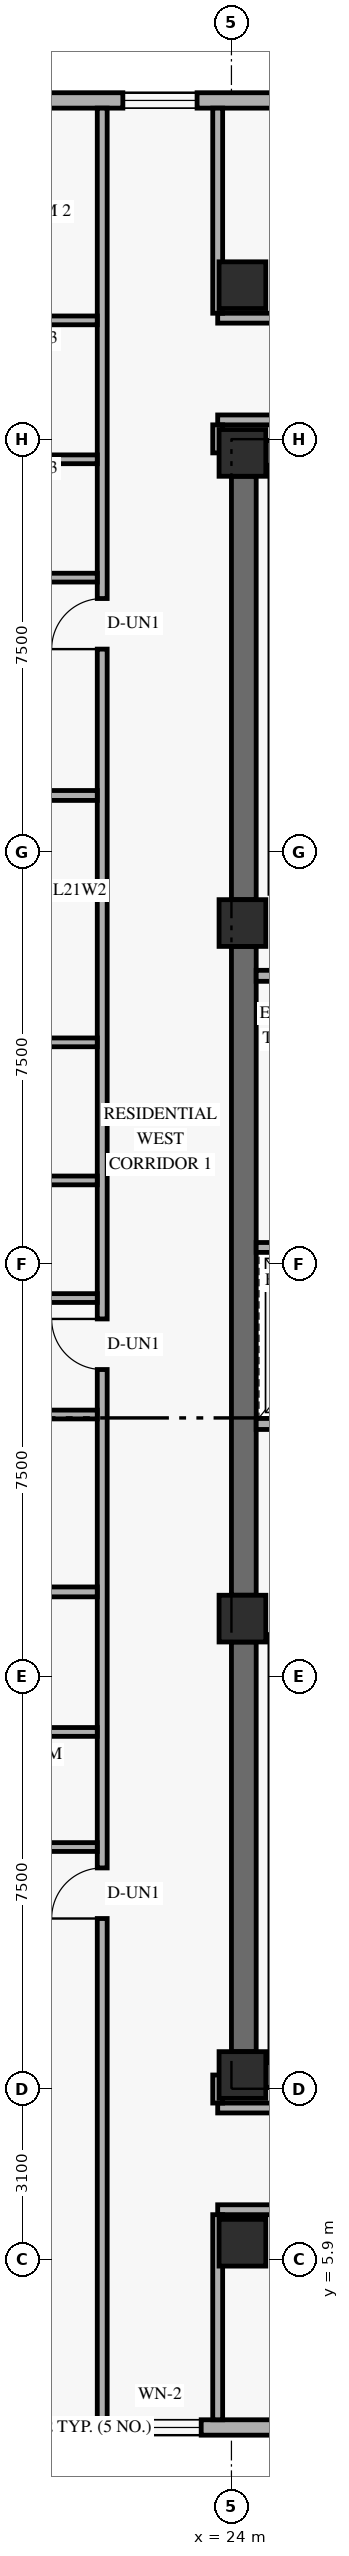
"""IFC4 building model, lengths in metres.
Left out: names, types, materials, properties, quantities, classifications, styles, units other than length and angle.
Written with IfcOpenShell. Run it as: python <this file> out.ifc"""

import sys

from ifc_helpers import new_model, si_unit, direction, frame, frame_2d, origin, origin_2d, place, context, subcontext, project, spatial, rectangle, extrude, element, fill, save


model = new_model("IFC4")
c1 = context("Model", 3, precision=1e-05, world=origin(), true_north=direction((0.0, 1.0)))
c2 = subcontext(c1, "Body", "Model", "MODEL_VIEW")
j1 = project(units=[si_unit("LENGTHUNIT", "METRE"), si_unit("PLANEANGLEUNIT", "RADIAN")], contexts=[c1])
p1 = place(None, origin())
s1 = spatial("IfcSite", under=j1, at=p1, CompositionType="ELEMENT")
p2 = place(p1, origin())
s2 = spatial("IfcBuilding", under=s1, at=p2, CompositionType="ELEMENT")
p3 = place(p2, frame((0.0, 0.0, 84.0)))
s3 = spatial("IfcBuildingStorey", under=s2, at=p3, CompositionType="ELEMENT", Elevation=84.0)
p4 = place(p3, frame((24.225, 9.675, 0.0), z_axis=(0.0, 0.0, 1.0), x_axis=(0.0, 1.0, 0.0)))
e1 = element("IfcWall", 1, at=p4, inside=s3, PredefinedType="SHEAR", context=c2, shape_type="SweptSolid", body=[
    extrude(rectangle(XDim=7.45, YDim=0.45, at=frame_2d((3.725, 0.0))), origin(), (0.0, 0.0, 1.0), 2.749),
])
p5 = place(p3, frame((24.225, 17.975, 0.0), z_axis=(0.0, 0.0, 1.0), x_axis=(0.0, 1.0, 0.0)))
e2 = element("IfcWall", 2, at=p5, inside=s3, PredefinedType="SHEAR", context=c2, shape_type="SweptSolid", body=[
    extrude(rectangle(XDim=11.8, YDim=0.45, at=frame_2d((5.9, 0.0))), origin(), (0.0, 0.0, 1.0), 2.749),
])
p6 = place(p3, frame((24.225, 30.625, 0.0), z_axis=(0.0, 0.0, 1.0), x_axis=(0.0, 1.0, 0.0)))
e3 = element("IfcWall", 3, at=p6, inside=s3, PredefinedType="SHEAR", context=c2, shape_type="SweptSolid", body=[
    extrude(rectangle(XDim=7.7, YDim=0.45, at=frame_2d((3.85, 0.0))), origin(), (0.0, 0.0, 1.0), 2.749),
])
for number, where, z_axis, x_axis in (
    (4, (24.625, 9.25, 0.0), (0.0, 0.0, 1.0), (1.0, 0.0, 0.0)),
    (5, (24.625, 38.75, 0.0), (0.0, 0.0, 1.0), (1.0, 0.0, 0.0)),
):
    element("IfcWall", number, at=place(p3, frame(where, z_axis=z_axis, x_axis=x_axis)), inside=s3, PredefinedType="SHEAR", context=c2, shape_type="SweptSolid", body=[
        extrude(rectangle(XDim=10.15, YDim=0.45, at=frame_2d((5.075, 0.0))), origin(), (0.0, 0.0, 1.0), 3.36),
    ])
for number, where, z_axis, x_axis in (
    (6, (24.2, 6.2, 0.0), (0.0, 0.0, 1.0), (1.0, 0.0, 0.0)),
    (7, (24.2, 9.25, 0.0), (0.0, 0.0, 1.0), (1.0, 0.0, 0.0)),
    (8, (24.2, 17.55, 0.0), (0.0, 0.0, 1.0), (1.0, 0.0, 0.0)),
    (9, (24.2, 30.2, 0.0), (0.0, 0.0, 1.0), (1.0, 0.0, 0.0)),
    (10, (24.2, 38.75, 0.0), (0.0, 0.0, 1.0), (1.0, 0.0, 0.0)),
    (11, (24.2, 41.8, 0.0), (0.0, 0.0, 1.0), (1.0, 0.0, 0.0)),
):
    element("IfcColumn", number, at=place(p3, frame(where, z_axis=z_axis, x_axis=x_axis)), inside=s3, PredefinedType="COLUMN", context=c2, shape_type="SweptSolid", body=[
        extrude(rectangle(XDim=0.85, YDim=0.85, at=origin_2d()), origin(), (0.0, 0.0, 1.0), 3.6),
    ])
p7 = place(p3, frame((13.42, 2.84, 0.0), z_axis=(0.0, 0.0, 1.0), x_axis=(1.0, 0.0, 0.0)))
e12 = element("IfcWall", 12, at=p7, inside=s3, PredefinedType="SOLIDWALL", context=c2, shape_type="SweptSolid", body=[
    extrude(rectangle(XDim=15.481, YDim=0.28, at=frame_2d((7.741, 0.0))), origin(), (0.0, 0.0, 1.0), 3.36),
])
p8 = place(p7, frame((3.365, 0.0, 0.85)))
e13 = element("IfcOpeningElement", 13, at=p8, cuts=e12, PredefinedType="OPENING", context=c2, shape_type="SweptSolid", body=[
    extrude(rectangle(XDim=1.5, YDim=1.55, at=frame_2d((0.75, 0.775))), frame((0.0, 0.15, 0.0), z_axis=(0.0, -1.0, 0.0), x_axis=(1.0, 0.0, 0.0)), (0.0, 0.0, 1.0), 0.3),
])
p9 = place(p7, frame((8.53, 0.0, 0.85)))
e14 = element("IfcOpeningElement", 14, at=p9, cuts=e12, PredefinedType="OPENING", context=c2, shape_type="SweptSolid", body=[
    extrude(rectangle(XDim=1.5, YDim=1.55, at=frame_2d((0.75, 0.775))), frame((0.0, 0.15, 0.0), z_axis=(0.0, -1.0, 0.0), x_axis=(1.0, 0.0, 0.0)), (0.0, 0.0, 1.0), 0.3),
])
p10 = place(p7, frame((12.156, 0.0, 0.85)))
e15 = element("IfcOpeningElement", 15, at=p10, cuts=e12, PredefinedType="OPENING", context=c2, shape_type="SweptSolid", body=[
    extrude(rectangle(XDim=1.5, YDim=1.55, at=frame_2d((0.75, 0.775))), frame((0.0, 0.15, 0.0), z_axis=(0.0, -1.0, 0.0), x_axis=(1.0, 0.0, 0.0)), (0.0, 0.0, 1.0), 0.3),
])
p11 = place(p3, frame((49.98, 45.16, 0.0), z_axis=(0.0, 0.0, 1.0), x_axis=(-1.0, 0.0, 0.0)))
e16 = element("IfcWall", 16, at=p11, inside=s3, PredefinedType="SOLIDWALL", context=c2, shape_type="SweptSolid", body=[
    extrude(rectangle(XDim=36.56, YDim=0.28, at=frame_2d((18.28, 0.0))), origin(), (0.0, 0.0, 1.0), 3.36),
])
p12 = place(p11, frame((31.14, 0.0, 0.85)))
e17 = element("IfcOpeningElement", 17, at=p12, cuts=e16, PredefinedType="OPENING", context=c2, shape_type="SweptSolid", body=[
    extrude(rectangle(XDim=1.35, YDim=1.55, at=frame_2d((0.675, 0.775))), frame((0.0, 0.15, 0.0), z_axis=(0.0, -1.0, 0.0), x_axis=(1.0, 0.0, 0.0)), (0.0, 0.0, 1.0), 0.3),
])
p13 = place(p11, frame((26.605, 0.0, 0.85)))
e18 = element("IfcOpeningElement", 18, at=p13, cuts=e16, PredefinedType="OPENING", context=c2, shape_type="SweptSolid", body=[
    extrude(rectangle(XDim=1.35, YDim=1.55, at=frame_2d((0.675, 0.775))), frame((0.0, 0.15, 0.0), z_axis=(0.0, -1.0, 0.0), x_axis=(1.0, 0.0, 0.0)), (0.0, 0.0, 1.0), 0.3),
])
p14 = place(p11, frame((22.754, 0.0, 0.85)))
e19 = element("IfcOpeningElement", 19, at=p14, cuts=e16, PredefinedType="OPENING", context=c2, shape_type="SweptSolid", body=[
    extrude(rectangle(XDim=1.35, YDim=1.55, at=frame_2d((0.675, 0.775))), frame((0.0, 0.15, 0.0), z_axis=(0.0, -1.0, 0.0), x_axis=(1.0, 0.0, 0.0)), (0.0, 0.0, 1.0), 0.3),
])
p15 = place(p11, frame((16.919, 0.0, 0.85)))
e20 = element("IfcOpeningElement", 20, at=p15, cuts=e16, PredefinedType="OPENING", context=c2, shape_type="SweptSolid", body=[
    extrude(rectangle(XDim=1.35, YDim=1.55, at=frame_2d((0.675, 0.775))), frame((0.0, 0.15, 0.0), z_axis=(0.0, -1.0, 0.0), x_axis=(1.0, 0.0, 0.0)), (0.0, 0.0, 1.0), 0.3),
])
p16 = place(p11, frame((12.82, 0.0, 0.85)))
e21 = element("IfcOpeningElement", 21, at=p16, cuts=e16, PredefinedType="OPENING", context=c2, shape_type="SweptSolid", body=[
    extrude(rectangle(XDim=1.35, YDim=1.55, at=frame_2d((0.675, 0.775))), frame((0.0, 0.15, 0.0), z_axis=(0.0, -1.0, 0.0), x_axis=(1.0, 0.0, 0.0)), (0.0, 0.0, 1.0), 0.3),
])
p17 = place(p11, frame((7.758, 0.0, 0.85)))
e22 = element("IfcOpeningElement", 22, at=p17, cuts=e16, PredefinedType="OPENING", context=c2, shape_type="SweptSolid", body=[
    extrude(rectangle(XDim=1.35, YDim=1.55, at=frame_2d((0.675, 0.775))), frame((0.0, 0.15, 0.0), z_axis=(0.0, -1.0, 0.0), x_axis=(1.0, 0.0, 0.0)), (0.0, 0.0, 1.0), 0.3),
])
p18 = place(p11, frame((1.542, 0.0, 0.85)))
e23 = element("IfcOpeningElement", 23, at=p18, cuts=e16, PredefinedType="OPENING", context=c2, shape_type="SweptSolid", body=[
    extrude(rectangle(XDim=1.35, YDim=1.55, at=frame_2d((0.675, 0.775))), frame((0.0, 0.15, 0.0), z_axis=(0.0, -1.0, 0.0), x_axis=(1.0, 0.0, 0.0)), (0.0, 0.0, 1.0), 0.3),
])
p19 = place(p3, frame((24.45, 21.09, 0.0), z_axis=(0.0, 0.0, 1.0), x_axis=(1.0, 0.0, 0.0)))
e24 = element("IfcWall", 24, at=p19, inside=s3, PredefinedType="STANDARD", context=c2, shape_type="SweptSolid", body=[
    extrude(rectangle(XDim=6.83, YDim=0.2, at=frame_2d((3.415, 0.0))), origin(), (0.0, 0.0, 1.0), 3.36),
])
p20 = place(p19, frame((0.72, 0.0, 0.0)))
e25 = element("IfcOpeningElement", 25, at=p20, cuts=e24, PredefinedType="OPENING", context=c2, shape_type="SweptSolid", body=[
    extrude(rectangle(XDim=1.1, YDim=2.2, at=frame_2d((0.55, 1.1))), frame((0.0, 0.11, 0.0), z_axis=(0.0, -1.0, 0.0), x_axis=(1.0, 0.0, 0.0)), (0.0, 0.0, 1.0), 0.22),
])
p21 = place(p19, frame((3.32, 0.0, 0.0)))
e26 = element("IfcOpeningElement", 26, at=p21, cuts=e24, PredefinedType="OPENING", context=c2, shape_type="SweptSolid", body=[
    extrude(rectangle(XDim=1.1, YDim=2.2, at=frame_2d((0.55, 1.1))), frame((0.0, 0.11, 0.0), z_axis=(0.0, -1.0, 0.0), x_axis=(1.0, 0.0, 0.0)), (0.0, 0.0, 1.0), 0.22),
])
p22 = place(p3, frame((24.45, 24.3, 0.0), z_axis=(0.0, 0.0, 1.0), x_axis=(1.0, 0.0, 0.0)))
e27 = element("IfcWall", 27, at=p22, inside=s3, PredefinedType="STANDARD", context=c2, shape_type="SweptSolid", body=[
    extrude(rectangle(XDim=6.83, YDim=0.18, at=frame_2d((3.415, 0.0))), origin(), (0.0, 0.0, 1.0), 3.36),
])
p23 = place(p3, frame((24.45, 29.24, 0.0), z_axis=(0.0, 0.0, 1.0), x_axis=(1.0, 0.0, 0.0)))
e28 = element("IfcWall", 28, at=p23, inside=s3, PredefinedType="STANDARD", context=c2, shape_type="SweptSolid", body=[
    extrude(rectangle(XDim=3.65, YDim=0.2, at=frame_2d((1.825, 0.0))), origin(), (0.0, 0.0, 1.0), 3.36),
])
p24 = place(p3, frame((21.65, 2.98, 0.0), z_axis=(0.0, 0.0, 1.0), x_axis=(0.0, 1.0, 0.0)))
e29 = element("IfcWall", 29, at=p24, inside=s3, PredefinedType="STANDARD", context=c2, shape_type="SweptSolid", body=[
    extrude(rectangle(XDim=42.04, YDim=0.18, at=frame_2d((21.02, 0.0))), origin(), (0.0, 0.0, 1.0), 2.731),
])
p25 = place(p24, frame((9.116, 0.0, 0.0)))
e30 = element("IfcOpeningElement", 30, at=p25, cuts=e29, PredefinedType="OPENING", context=c2, shape_type="SweptSolid", body=[
    extrude(rectangle(XDim=0.92, YDim=2.15, at=frame_2d((0.46, 1.075))), frame((0.0, 0.1, 0.0), z_axis=(0.0, -1.0, 0.0), x_axis=(1.0, 0.0, 0.0)), (0.0, 0.0, 1.0), 0.2),
])
p26 = place(p24, frame((19.1, 0.0, 0.0)))
e31 = element("IfcOpeningElement", 31, at=p26, cuts=e29, PredefinedType="OPENING", context=c2, shape_type="SweptSolid", body=[
    extrude(rectangle(XDim=0.92, YDim=2.15, at=frame_2d((0.46, 1.075))), frame((0.0, 0.1, 0.0), z_axis=(0.0, -1.0, 0.0), x_axis=(1.0, 0.0, 0.0)), (0.0, 0.0, 1.0), 0.2),
])
p27 = place(p24, frame((32.201, 0.0, 0.0)))
e32 = element("IfcOpeningElement", 32, at=p27, cuts=e29, PredefinedType="OPENING", context=c2, shape_type="SweptSolid", body=[
    extrude(rectangle(XDim=0.92, YDim=2.15, at=frame_2d((0.46, 1.075))), frame((0.0, 0.1, 0.0), z_axis=(0.0, -1.0, 0.0), x_axis=(1.0, 0.0, 0.0)), (0.0, 0.0, 1.0), 0.2),
])
p28 = place(p3, frame((23.75, 6.8, 0.0), z_axis=(0.0, 0.0, 1.0), x_axis=(1.0, 0.0, 0.0)))
e33 = element("IfcWall", 33, at=p28, inside=s3, PredefinedType="STANDARD", context=c2, shape_type="SweptSolid", body=[
    extrude(rectangle(XDim=11.67, YDim=0.18, at=frame_2d((5.835, 0.0))), origin(), (0.0, 0.0, 1.0), 2.731),
])
p29 = place(p28, frame((1.5, 0.0, 0.0)))
e34 = element("IfcOpeningElement", 34, at=p29, cuts=e33, PredefinedType="OPENING", context=c2, shape_type="SweptSolid", body=[
    extrude(rectangle(XDim=0.95, YDim=2.15, at=frame_2d((0.475, 1.075))), frame((0.0, 0.1, 0.0), z_axis=(0.0, -1.0, 0.0), x_axis=(1.0, 0.0, 0.0)), (0.0, 0.0, 1.0), 0.2),
])
p30 = place(p28, frame((7.826, 0.0, 0.0)))
e35 = element("IfcOpeningElement", 35, at=p30, cuts=e33, PredefinedType="OPENING", context=c2, shape_type="SweptSolid", body=[
    extrude(rectangle(XDim=0.92, YDim=2.15, at=frame_2d((0.46, 1.075))), frame((0.0, 0.1, 0.0), z_axis=(0.0, -1.0, 0.0), x_axis=(1.0, 0.0, 0.0)), (0.0, 0.0, 1.0), 0.2),
])
p31 = place(p3, frame((23.75, 8.65, 0.0), z_axis=(0.0, 0.0, 1.0), x_axis=(1.0, 0.0, 0.0)))
e36 = element("IfcWall", 36, at=p31, inside=s3, PredefinedType="STANDARD", context=c2, shape_type="SweptSolid", body=[
    extrude(rectangle(XDim=11.67, YDim=0.18, at=frame_2d((5.835, 0.0))), origin(), (0.0, 0.0, 1.0), 2.731),
])
p32 = place(p3, frame((23.75, 41.2, 0.0), z_axis=(0.0, 0.0, 1.0), x_axis=(1.0, 0.0, 0.0)))
e37 = element("IfcWall", 37, at=p32, inside=s3, PredefinedType="STANDARD", context=c2, shape_type="SweptSolid", body=[
    extrude(rectangle(XDim=11.67, YDim=0.18, at=frame_2d((5.835, 0.0))), origin(), (0.0, 0.0, 1.0), 2.731),
])
p33 = place(p32, frame((1.6, 0.0, 0.0)))
e38 = element("IfcOpeningElement", 38, at=p33, cuts=e37, PredefinedType="OPENING", context=c2, shape_type="SweptSolid", body=[
    extrude(rectangle(XDim=0.95, YDim=2.15, at=frame_2d((0.475, 1.075))), frame((0.0, 0.1, 0.0), z_axis=(0.0, -1.0, 0.0), x_axis=(1.0, 0.0, 0.0)), (0.0, 0.0, 1.0), 0.2),
])
p34 = place(p32, frame((8.176, 0.0, 0.0)))
e39 = element("IfcOpeningElement", 39, at=p34, cuts=e37, PredefinedType="OPENING", context=c2, shape_type="SweptSolid", body=[
    extrude(rectangle(XDim=0.92, YDim=2.15, at=frame_2d((0.46, 1.075))), frame((0.0, 0.1, 0.0), z_axis=(0.0, -1.0, 0.0), x_axis=(1.0, 0.0, 0.0)), (0.0, 0.0, 1.0), 0.2),
])
p35 = place(p3, frame((23.75, 39.35, 0.0), z_axis=(0.0, 0.0, 1.0), x_axis=(1.0, 0.0, 0.0)))
e40 = element("IfcWall", 40, at=p35, inside=s3, PredefinedType="STANDARD", context=c2, shape_type="SweptSolid", body=[
    extrude(rectangle(XDim=11.67, YDim=0.18, at=frame_2d((5.835, 0.0))), origin(), (0.0, 0.0, 1.0), 2.731),
])
for number, where, z_axis, x_axis in (
    (41, (23.75, 8.74, 0.0), (0.0, 0.0, 1.0), (0.0, 1.0, 0.0)),
    (42, (23.75, 38.75, 0.0), (0.0, 0.0, 1.0), (0.0, 1.0, 0.0)),
):
    element("IfcWall", number, at=place(p3, frame(where, z_axis=z_axis, x_axis=x_axis)), inside=s3, PredefinedType="STANDARD", context=c2, shape_type="SweptSolid", body=[
        extrude(rectangle(XDim=0.51, YDim=0.18, at=frame_2d((0.255, 0.0))), origin(), (0.0, 0.0, 1.0), 2.731),
    ])
p36 = place(p3, frame((16.03, 13.396, 0.0), z_axis=(0.0, 0.0, 1.0), x_axis=(1.0, 0.0, 0.0)))
e43 = element("IfcWall", 43, at=p36, inside=s3, PredefinedType="PLUMBINGWALL", context=c2, shape_type="SweptSolid", body=[
    extrude(rectangle(XDim=5.53, YDim=0.16, at=frame_2d((2.765, 0.0))), origin(), (0.0, 0.0, 1.0), 2.731),
])
p37 = place(p3, frame((16.19, 15.489, 0.0), z_axis=(0.0, 0.0, 1.0), x_axis=(1.0, 0.0, 0.0)))
e44 = element("IfcWall", 44, at=p37, inside=s3, PredefinedType="PLUMBINGWALL", context=c2, shape_type="SweptSolid", body=[
    extrude(rectangle(XDim=5.37, YDim=0.16, at=frame_2d((2.685, 0.0))), origin(), (0.0, 0.0, 1.0), 2.731),
])
p38 = place(p3, frame((10.08, 18.036, 0.0), z_axis=(0.0, 0.0, 1.0), x_axis=(1.0, 0.0, 0.0)))
e45 = element("IfcWall", 45, at=p38, inside=s3, PredefinedType="PARTITIONING", context=c2, shape_type="SweptSolid", body=[
    extrude(rectangle(XDim=11.48, YDim=0.18, at=frame_2d((5.74, 0.0))), origin(), (0.0, 0.0, 1.0), 2.731),
])
p39 = place(p3, frame((10.08, 28.03, 0.0), z_axis=(0.0, 0.0, 1.0), x_axis=(1.0, 0.0, 0.0)))
e46 = element("IfcWall", 46, at=p39, inside=s3, PredefinedType="PARTITIONING", context=c2, shape_type="SweptSolid", body=[
    extrude(rectangle(XDim=11.48, YDim=0.16, at=frame_2d((5.74, 0.0))), origin(), (0.0, 0.0, 1.0), 2.731),
])
p40 = place(p39, frame((7.913, 0.0, 0.0)))
e47 = element("IfcOpeningElement", 47, at=p40, cuts=e46, PredefinedType="OPENING", context=c2, shape_type="SweptSolid", body=[
    extrude(rectangle(XDim=0.88, YDim=2.12, at=frame_2d((0.44, 1.06))), frame((0.0, 0.09, 0.0), z_axis=(0.0, -1.0, 0.0), x_axis=(1.0, 0.0, 0.0)), (0.0, 0.0, 1.0), 0.18),
])
p41 = place(p39, frame((2.568, 0.0, 0.0)))
e48 = element("IfcOpeningElement", 48, at=p41, cuts=e46, PredefinedType="OPENING", context=c2, shape_type="SweptSolid", body=[
    extrude(rectangle(XDim=0.9, YDim=2.14, at=frame_2d((0.45, 1.07))), frame((0.0, 0.09, 0.0), z_axis=(0.0, -1.0, 0.0), x_axis=(1.0, 0.0, 0.0)), (0.0, 0.0, 1.0), 0.18),
])
p42 = place(p3, frame((19.0, 23.38, 0.0), z_axis=(0.0, 0.0, 1.0), x_axis=(1.0, 0.0, 0.0)))
e49 = element("IfcWall", 49, at=p42, inside=s3, PredefinedType="PLUMBINGWALL", context=c2, shape_type="SweptSolid", body=[
    extrude(rectangle(XDim=2.56, YDim=0.16, at=frame_2d((1.28, 0.0))), origin(), (0.0, 0.0, 1.0), 3.36),
])
p43 = place(p3, frame((19.16, 25.519, 0.0), z_axis=(0.0, 0.0, 1.0), x_axis=(1.0, 0.0, 0.0)))
e50 = element("IfcWall", 50, at=p43, inside=s3, PredefinedType="PLUMBINGWALL", context=c2, shape_type="SweptSolid", body=[
    extrude(rectangle(XDim=2.4, YDim=0.16, at=frame_2d((1.2, 0.0))), origin(), (0.0, 0.0, 1.0), 3.36),
])
p44 = place(p3, frame((10.08, 21.262, 0.0), z_axis=(0.0, 0.0, 1.0), x_axis=(1.0, 0.0, 0.0)))
e51 = element("IfcWall", 51, at=p44, inside=s3, PredefinedType="PARTITIONING", context=c2, shape_type="SweptSolid", body=[
    extrude(rectangle(XDim=11.48, YDim=0.16, at=frame_2d((5.74, 0.0))), origin(), (0.0, 0.0, 1.0), 2.731),
])
p45 = place(p44, frame((5.195, 0.0, 0.0)))
e52 = element("IfcOpeningElement", 52, at=p45, cuts=e51, PredefinedType="OPENING", context=c2, shape_type="SweptSolid", body=[
    extrude(rectangle(XDim=0.95, YDim=2.15, at=frame_2d((0.475, 1.075))), frame((0.0, 0.09, 0.0), z_axis=(0.0, -1.0, 0.0), x_axis=(1.0, 0.0, 0.0)), (0.0, 0.0, 1.0), 0.18),
])
p46 = place(p3, frame((10.08, 32.52, 0.0), z_axis=(0.0, 0.0, 1.0), x_axis=(1.0, 0.0, 0.0)))
e53 = element("IfcWall", 53, at=p46, inside=s3, PredefinedType="PARTITIONING", context=c2, shape_type="SweptSolid", body=[
    extrude(rectangle(XDim=11.48, YDim=0.18, at=frame_2d((5.74, 0.0))), origin(), (0.0, 0.0, 1.0), 2.731),
])
p47 = place(p3, frame((10.08, 41.16, 0.0), z_axis=(0.0, 0.0, 1.0), x_axis=(1.0, 0.0, 0.0)))
e54 = element("IfcWall", 54, at=p47, inside=s3, PredefinedType="PARTITIONING", context=c2, shape_type="SweptSolid", body=[
    extrude(rectangle(XDim=11.48, YDim=0.16, at=frame_2d((5.74, 0.0))), origin(), (0.0, 0.0, 1.0), 2.731),
])
p48 = place(p47, frame((3.24, 0.0, 0.0)))
e55 = element("IfcOpeningElement", 55, at=p48, cuts=e54, PredefinedType="OPENING", context=c2, shape_type="SweptSolid", body=[
    extrude(rectangle(XDim=0.88, YDim=2.14, at=frame_2d((0.44, 1.07))), frame((0.0, 0.09, 0.0), z_axis=(0.0, -1.0, 0.0), x_axis=(1.0, 0.0, 0.0)), (0.0, 0.0, 1.0), 0.18),
])
p49 = place(p47, frame((4.87, 0.0, 0.0)))
e56 = element("IfcOpeningElement", 56, at=p49, cuts=e54, PredefinedType="OPENING", context=c2, shape_type="SweptSolid", body=[
    extrude(rectangle(XDim=0.88, YDim=2.14, at=frame_2d((0.44, 1.07))), frame((0.0, 0.09, 0.0), z_axis=(0.0, -1.0, 0.0), x_axis=(1.0, 0.0, 0.0)), (0.0, 0.0, 1.0), 0.18),
])
p50 = place(p3, frame((16.03, 36.481, 0.0), z_axis=(0.0, 0.0, 1.0), x_axis=(1.0, 0.0, 0.0)))
e57 = element("IfcWall", 57, at=p50, inside=s3, PredefinedType="PLUMBINGWALL", context=c2, shape_type="SweptSolid", body=[
    extrude(rectangle(XDim=5.53, YDim=0.16, at=frame_2d((2.765, 0.0))), origin(), (0.0, 0.0, 1.0), 2.731),
])
p51 = place(p3, frame((16.19, 38.634, 0.0), z_axis=(0.0, 0.0, 1.0), x_axis=(1.0, 0.0, 0.0)))
e58 = element("IfcWall", 58, at=p51, inside=s3, PredefinedType="PLUMBINGWALL", context=c2, shape_type="SweptSolid", body=[
    extrude(rectangle(XDim=5.37, YDim=0.16, at=frame_2d((2.685, 0.0))), origin(), (0.0, 0.0, 1.0), 2.731),
])
for number, where, z_axis, x_axis in (
    (59, (23.75, 2.98, 0.0), (0.0, 0.0, 1.0), (0.0, 1.0, 0.0)),
    (60, (23.75, 41.29, 0.0), (0.0, 0.0, 1.0), (0.0, 1.0, 0.0)),
):
    element("IfcWall", number, at=place(p3, frame(where, z_axis=z_axis, x_axis=x_axis)), inside=s3, PredefinedType="PARTITIONING", context=c2, shape_type="SweptSolid", body=[
        extrude(rectangle(XDim=3.73, YDim=0.18, at=frame_2d((1.865, 0.0))), origin(), (0.0, 0.0, 1.0), 2.809),
    ])
p52 = place(p9, origin())
e61 = element("IfcWindow", 61, at=p52, inside=s3, PartitioningType="SINGLE_PANEL", PredefinedType="WINDOW", context=c2, shape_type="SweptSolid", body=[
    extrude(rectangle(XDim=1.5, YDim=1.55, at=frame_2d((0.75, 0.775))), frame((0.0, 0.03, 0.0), z_axis=(0.0, -1.0, 0.0), x_axis=(1.0, 0.0, 0.0)), (0.0, 0.0, 1.0), 0.06),
])
fill(e14, e61)
p53 = place(p13, origin())
e62 = element("IfcWindow", 62, at=p53, inside=s3, PartitioningType="SINGLE_PANEL", PredefinedType="WINDOW", context=c2, shape_type="SweptSolid", body=[
    extrude(rectangle(XDim=1.35, YDim=1.55, at=frame_2d((0.675, 0.775))), frame((0.0, 0.03, 0.0), z_axis=(0.0, -1.0, 0.0), x_axis=(1.0, 0.0, 0.0)), (0.0, 0.0, 1.0), 0.06),
])
fill(e18, e62)
p54 = place(p25, origin())
e63 = element("IfcDoor", 63, at=p54, inside=s3, OperationType="SINGLE_SWING_LEFT", PredefinedType="DOOR", context=c2, shape_type="SweptSolid", body=[
    extrude(rectangle(XDim=0.92, YDim=2.15, at=frame_2d((0.46, 1.075))), frame((0.0, 0.025, 0.0), z_axis=(0.0, -1.0, 0.0), x_axis=(1.0, 0.0, 0.0)), (0.0, 0.0, 1.0), 0.05),
])
fill(e30, e63)
p55 = place(p26, origin())
e64 = element("IfcDoor", 64, at=p55, inside=s3, OperationType="SINGLE_SWING_RIGHT", PredefinedType="DOOR", context=c2, shape_type="SweptSolid", body=[
    extrude(rectangle(XDim=0.92, YDim=2.15, at=frame_2d((0.46, 1.075))), frame((0.0, 0.025, 0.0), z_axis=(0.0, -1.0, 0.0), x_axis=(1.0, 0.0, 0.0)), (0.0, 0.0, 1.0), 0.05),
])
fill(e31, e64)
p56 = place(p27, origin())
e65 = element("IfcDoor", 65, at=p56, inside=s3, OperationType="SINGLE_SWING_LEFT", PredefinedType="DOOR", context=c2, shape_type="SweptSolid", body=[
    extrude(rectangle(XDim=0.92, YDim=2.15, at=frame_2d((0.46, 1.075))), frame((0.0, 0.025, 0.0), z_axis=(0.0, -1.0, 0.0), x_axis=(1.0, 0.0, 0.0)), (0.0, 0.0, 1.0), 0.05),
])
fill(e32, e65)
save(model, sys.argv[1])
